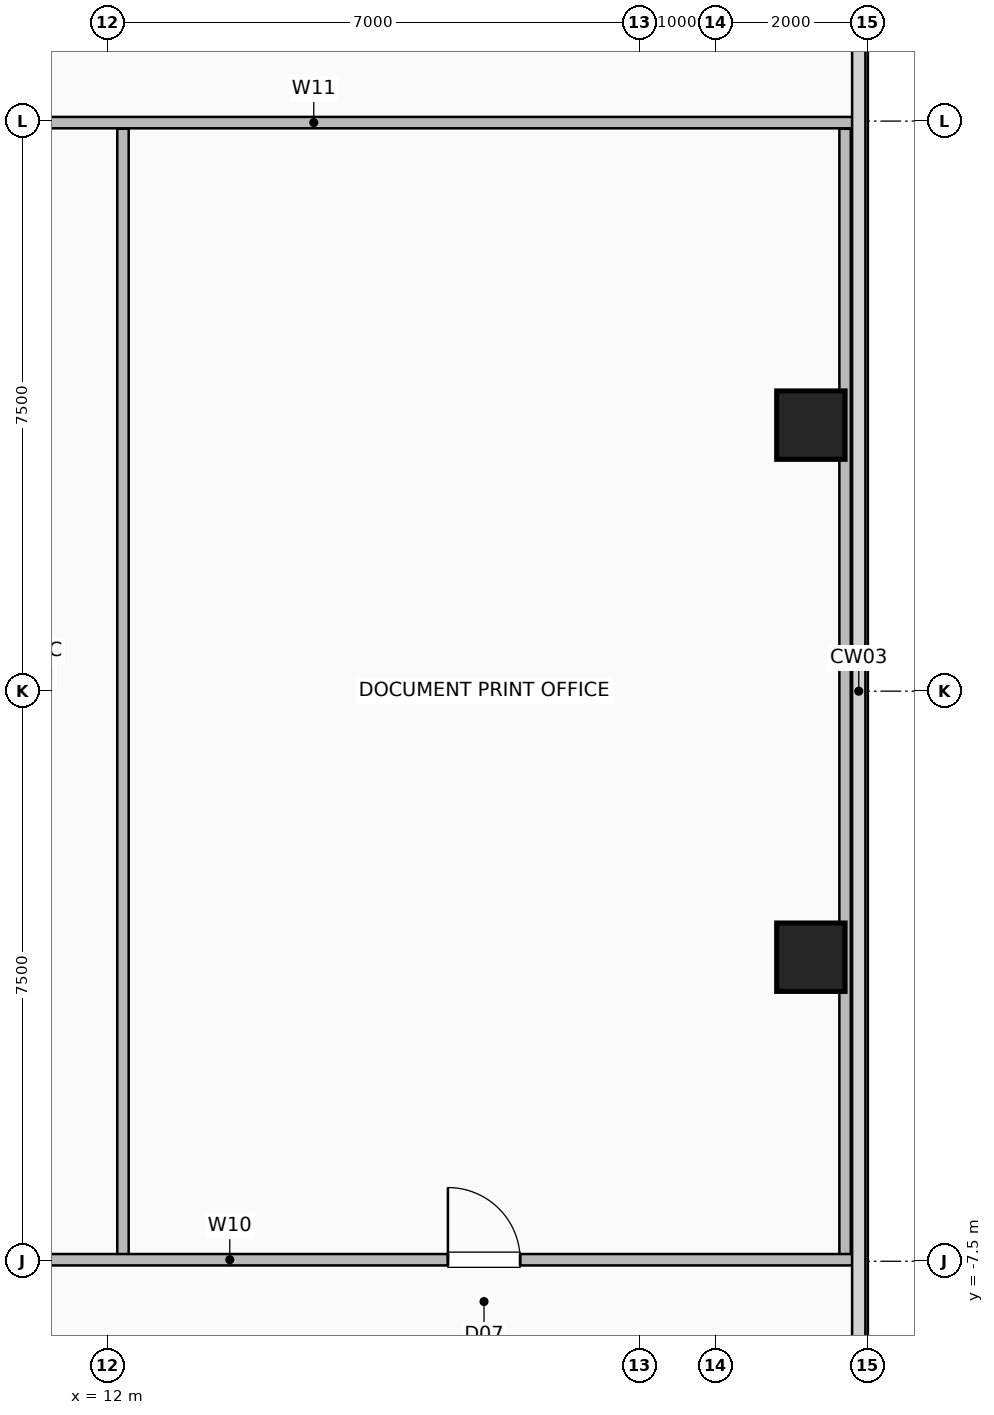
"""IFC4 building model, lengths in metres.
Left out: names, types, materials, properties, quantities, classifications, styles, units other than length and angle.
Written with IfcOpenShell. Run it as: python <this file> out.ifc"""

import sys

from ifc_helpers import new_model, si_unit, direction, frame, frame_2d, origin, origin_2d, place, context, subcontext, project, spatial, rectangle, hollow_rectangle, extrude, element, fill, save


model = new_model("IFC4")
c1 = context("Model", 3, precision=1e-05, world=origin(), true_north=direction((0.0, 1.0)))
c2 = subcontext(c1, "Body", "Model", "MODEL_VIEW")
j1 = project(units=[si_unit("LENGTHUNIT", "METRE"), si_unit("PLANEANGLEUNIT", "RADIAN")], contexts=[c1])
p1 = place(None, origin())
s1 = spatial("IfcSite", under=j1, at=p1, CompositionType="ELEMENT")
p2 = place(p1, origin())
s2 = spatial("IfcBuilding", under=s1, at=p2, CompositionType="ELEMENT")
p3 = place(p2, frame((0.0, 0.0, 97.6)))
s3 = spatial("IfcBuildingStorey", under=s2, at=p3, CompositionType="ELEMENT", Elevation=97.6)
for number, where, z_axis, x_axis in (
    (1, (21.25, -3.5, 0.0), (0.0, 0.0, 1.0), (1.0, 0.0, 0.0)),
    (2, (21.25, 3.5, 0.0), (0.0, 0.0, 1.0), (1.0, 0.0, 0.0)),
):
    element("IfcColumn", number, at=place(p3, frame(where, z_axis=z_axis, x_axis=x_axis)), inside=s3, PredefinedType="COLUMN", context=c2, shape_type="SweptSolid", body=[
        extrude(hollow_rectangle(XDim=0.9, YDim=0.9, WallThickness=0.045, at=origin_2d()), origin(), (0.0, 0.0, 1.0), 3.6),
    ])
for number, where, z_axis, x_axis in (
    (3, (12.2, -7.48, 0.0), (0.0, 0.0, 1.0), (0.0, 1.0, 0.0)),
    (4, (21.7, -7.48, 0.0), (0.0, 0.0, 1.0), (0.0, 1.0, 0.0)),
):
    element("IfcWall", number, at=place(p3, frame(where, z_axis=z_axis, x_axis=x_axis)), inside=s3, PredefinedType="PARTITIONING", context=c2, shape_type="SweptSolid", body=[
        extrude(rectangle(XDim=14.88, YDim=0.15, at=frame_2d((7.44, 0.0))), origin(), (0.0, 0.0, 1.0), 3.36),
    ])
p4 = place(p3, frame((8.28, -7.48, 0.0), z_axis=(0.0, 0.0, 1.0), x_axis=(1.0, 0.0, 0.0)))
e5 = element("IfcWall", 5, at=p4, inside=s3, PredefinedType="PARTITIONING", context=c2, shape_type="SweptSolid", body=[
    extrude(rectangle(XDim=13.54, YDim=0.15, at=frame_2d((6.77, 0.0))), origin(), (0.0, 0.0, 1.0), 3.36),
])
p5 = place(p4, frame((1.505, 0.0, 0.0)))
e6 = element("IfcOpeningElement", 6, at=p5, cuts=e5, PredefinedType="OPENING", context=c2, shape_type="SweptSolid", body=[
    extrude(rectangle(XDim=0.95, YDim=2.06, at=frame_2d((0.475, 1.03))), frame((0.0, 0.085, 0.0), z_axis=(0.0, -1.0, 0.0), x_axis=(1.0, 0.0, 0.0)), (0.0, 0.0, 1.0), 0.17),
])
p6 = place(p4, frame((8.195, 0.0, 0.0)))
e7 = element("IfcOpeningElement", 7, at=p6, cuts=e5, PredefinedType="OPENING", context=c2, shape_type="SweptSolid", body=[
    extrude(rectangle(XDim=0.95, YDim=2.06, at=frame_2d((0.475, 1.03))), frame((0.0, 0.085, 0.0), z_axis=(0.0, -1.0, 0.0), x_axis=(1.0, 0.0, 0.0)), (0.0, 0.0, 1.0), 0.17),
])
p7 = place(p3, frame((7.6, 7.48, 0.0), z_axis=(0.0, 0.0, 1.0), x_axis=(1.0, 0.0, 0.0)))
e8 = element("IfcWall", 8, at=p7, inside=s3, PredefinedType="PARTITIONING", context=c2, shape_type="SweptSolid", body=[
    extrude(rectangle(XDim=14.22, YDim=0.15, at=frame_2d((7.11, 0.0))), origin(), (0.0, 0.0, 1.0), 3.36),
])
p8 = place(p6, origin())
e9 = element("IfcDoor", 9, at=p8, inside=s3, OperationType="SINGLE_SWING_LEFT", PredefinedType="DOOR", context=c2, shape_type="SweptSolid", body=[
    extrude(rectangle(XDim=0.95, YDim=2.06, at=frame_2d((0.475, 1.03))), frame((0.0, 0.025, 0.0), z_axis=(0.0, -1.0, 0.0), x_axis=(1.0, 0.0, 0.0)), (0.0, 0.0, 1.0), 0.05),
])
fill(e7, e9)
save(model, sys.argv[1])
